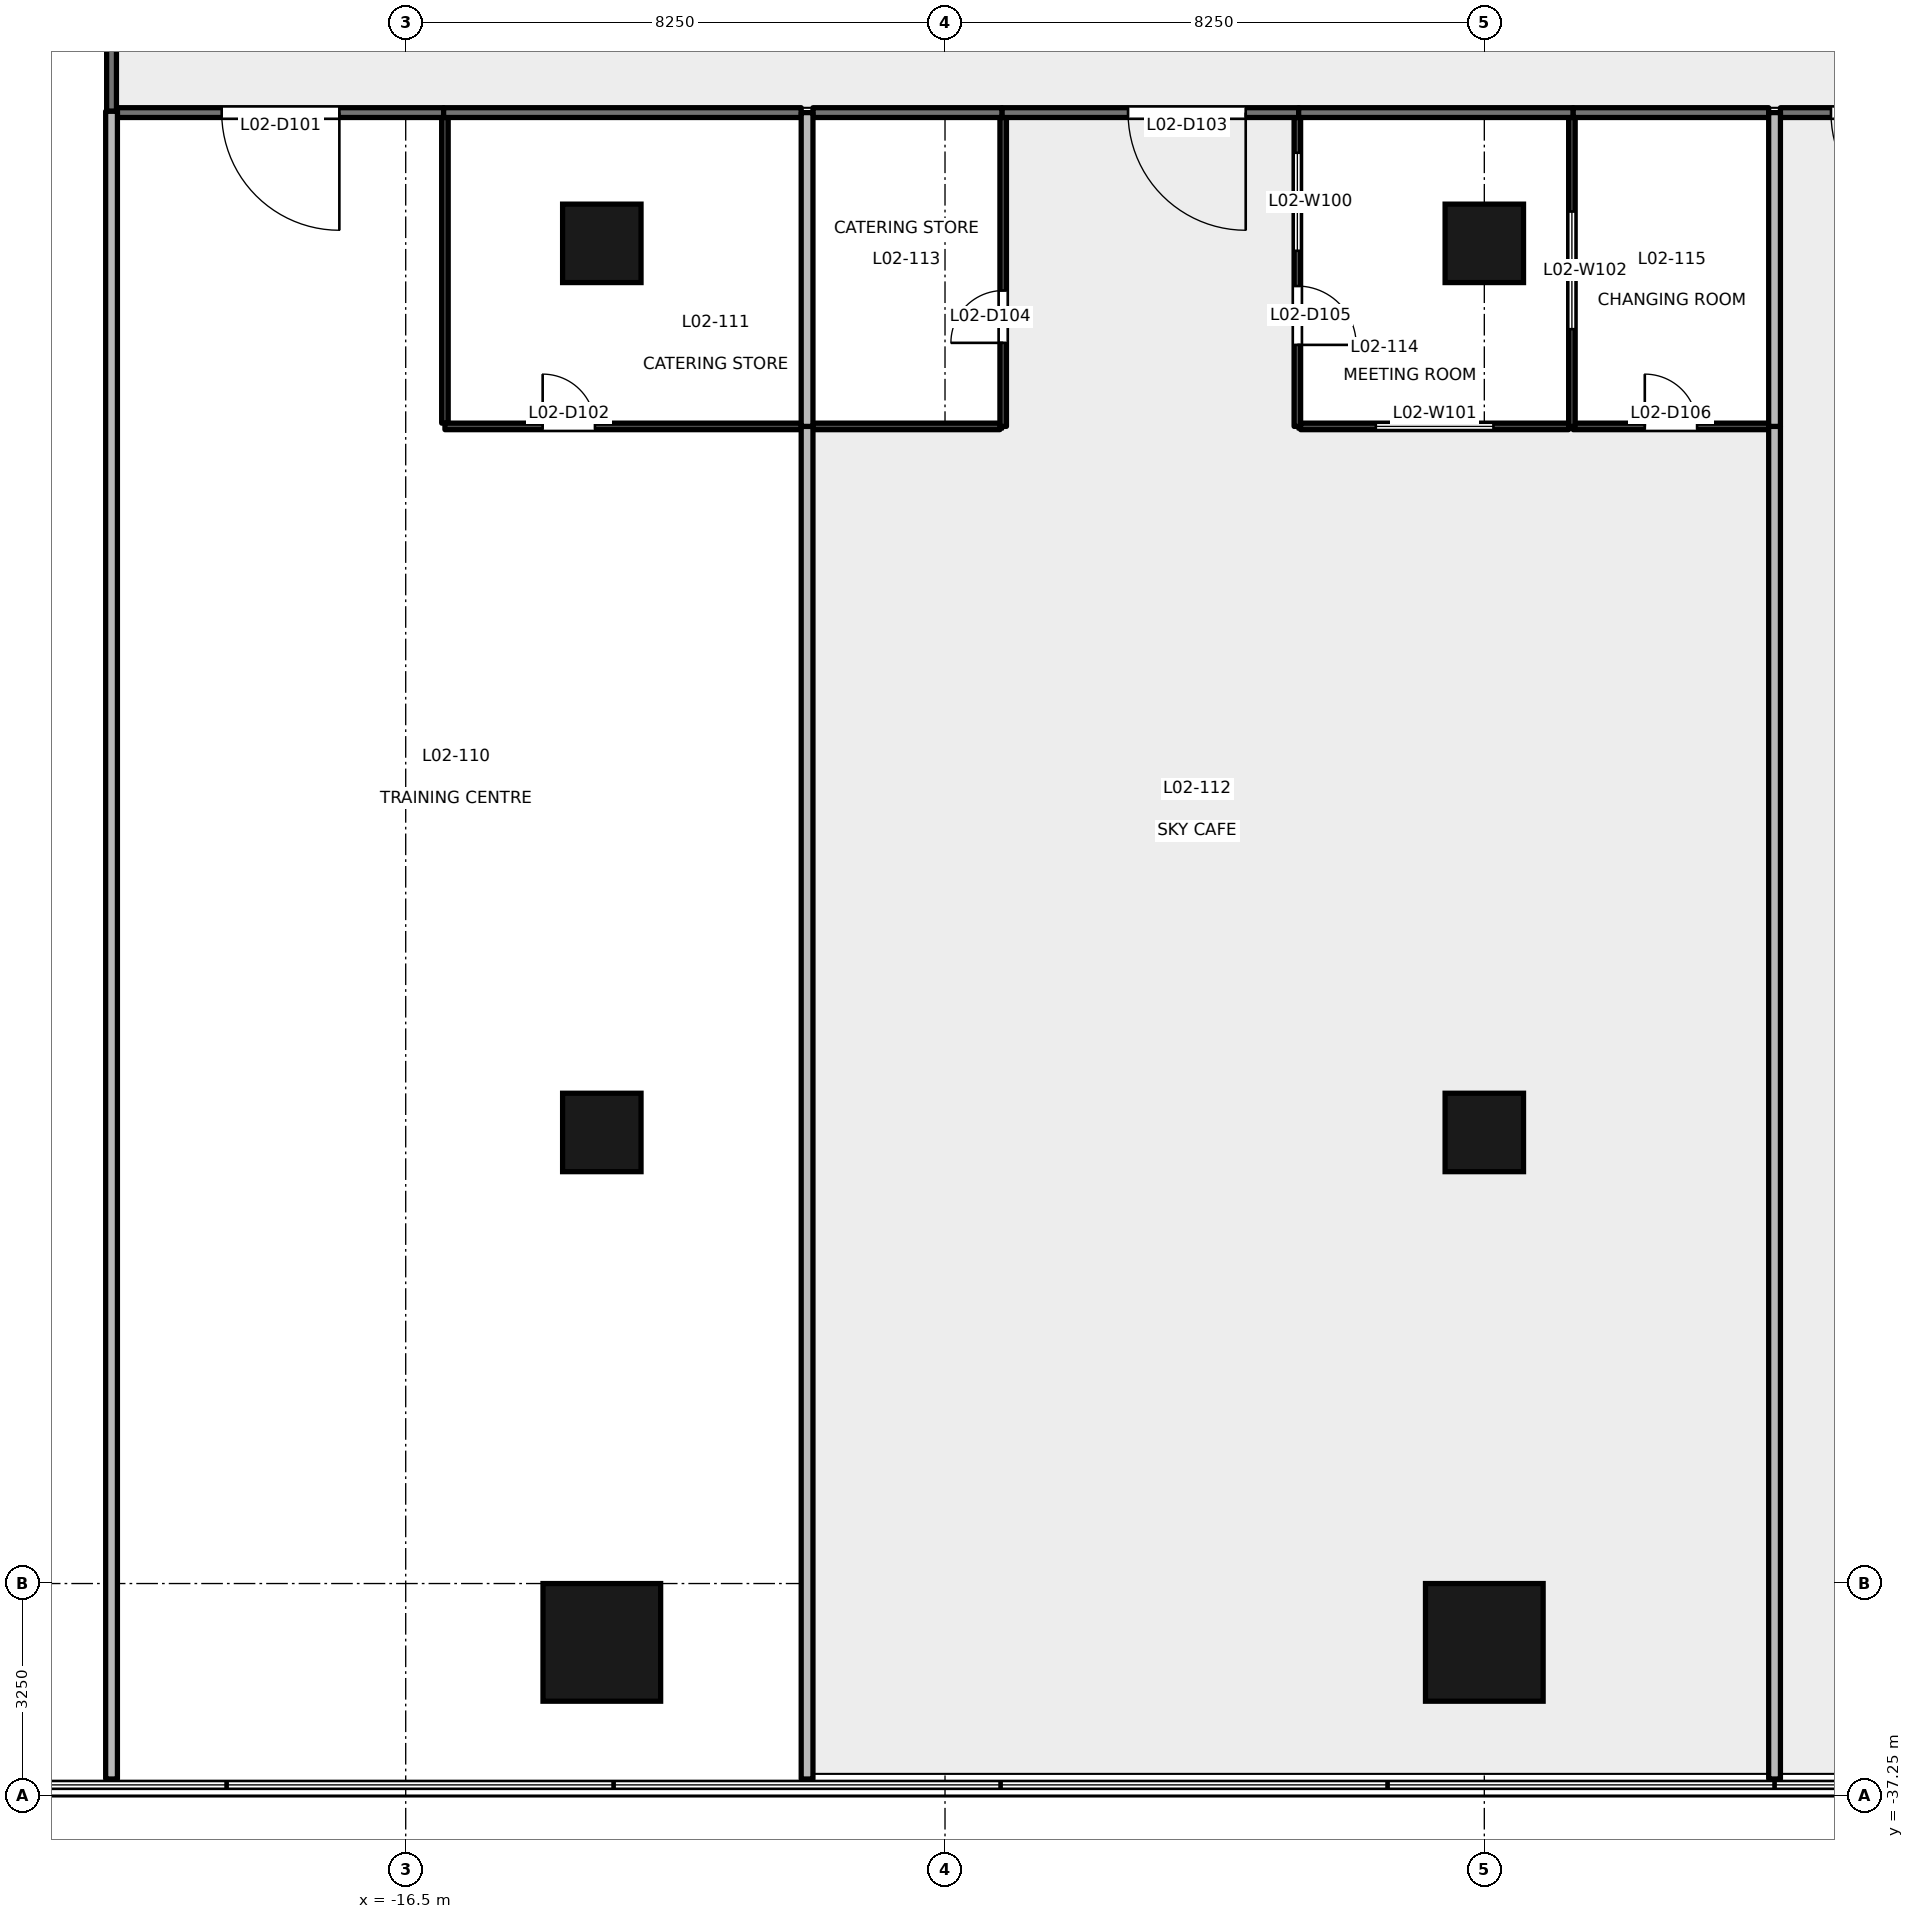
"""IFC4 building model, lengths in metres.
Left out: names, types, materials, properties, quantities, classifications, styles, units other than length and angle.
Written with IfcOpenShell. Run it as: python <this file> out.ifc"""

import sys

from ifc_helpers import new_model, si_unit, direction, frame, frame_2d, origin, origin_2d, place, context, subcontext, project, spatial, rectangle, extrude, element, fill, save


model = new_model("IFC4")
c1 = context("Model", 3, precision=1e-05, world=origin(), true_north=direction((0.0, 1.0)))
c2 = subcontext(c1, "Body", "Model", "MODEL_VIEW")
j1 = project(units=[si_unit("LENGTHUNIT", "METRE"), si_unit("PLANEANGLEUNIT", "RADIAN")], contexts=[c1])
p1 = place(None, origin())
s1 = spatial("IfcSite", under=j1, at=p1, CompositionType="ELEMENT")
p2 = place(p1, origin())
s2 = spatial("IfcBuilding", under=s1, at=p2, CompositionType="ELEMENT")
p3 = place(p2, frame((0.0, 0.0, 12.6)))
s3 = spatial("IfcBuildingStorey", under=s2, at=p3, CompositionType="ELEMENT", Elevation=12.6)
for number, where, z_axis, x_axis in (
    (1, (-13.5, -34.9, -0.2), (0.0, 0.0, 1.0), (1.0, 0.0, 0.0)),
    (2, (0.0, -34.9, -0.2), (0.0, 0.0, 1.0), (1.0, 0.0, 0.0)),
):
    element("IfcColumn", number, at=place(p3, frame(where, z_axis=z_axis, x_axis=x_axis)), inside=s3, PredefinedType="COLUMN", context=c2, shape_type="SweptSolid", body=[
        extrude(rectangle(XDim=1.8, YDim=1.8, at=origin_2d()), origin(), (0.0, 0.0, 1.0), 4.8),
    ])
for number, where, z_axis, x_axis in (
    (3, (-13.5, -27.1, -0.2), (0.0, 0.0, 1.0), (1.0, 0.0, 0.0)),
    (4, (0.0, -27.1, -0.2), (0.0, 0.0, 1.0), (1.0, 0.0, 0.0)),
    (5, (-13.5, -13.5, -0.2), (0.0, 0.0, 1.0), (1.0, 0.0, 0.0)),
    (6, (0.0, -13.5, -0.2), (0.0, 0.0, 1.0), (1.0, 0.0, 0.0)),
):
    element("IfcColumn", number, at=place(p3, frame(where, z_axis=z_axis, x_axis=x_axis)), inside=s3, PredefinedType="COLUMN", context=c2, shape_type="SweptSolid", body=[
        extrude(rectangle(XDim=1.2, YDim=1.2, at=origin_2d()), origin(), (0.0, 0.0, 1.0), 4.8),
    ])
p4 = place(p3, frame((-21.0, -11.48, 0.0), z_axis=(0.0, 0.0, 1.0), x_axis=(0.0, 1.0, 0.0)))
e7 = element("IfcWall", 7, at=p4, inside=s3, PredefinedType="PARTITIONING", context=c2, shape_type="SweptSolid", body=[
    extrude(rectangle(XDim=4.08, YDim=0.15, at=frame_2d((2.04, 0.0))), origin(), (0.0, 0.0, 1.0), 4.6),
])
p5 = place(p4, frame((1.054, 0.0, 0.0)))
e8 = element("IfcOpeningElement", 8, at=p5, cuts=e7, PredefinedType="OPENING", context=c2, shape_type="SweptSolid", body=[
    extrude(rectangle(XDim=0.9, YDim=2.1, at=frame_2d((0.45, 1.05))), frame((0.0, 0.085, 0.0), z_axis=(0.0, -1.0, 0.0), x_axis=(1.0, 0.0, 0.0)), (0.0, 0.0, 1.0), 0.171),
])
p6 = place(p3, frame((-15.92, -11.5, 0.0), z_axis=(0.0, 0.0, 1.0), x_axis=(-1.0, 0.0, 0.0)))
e9 = element("IfcWall", 9, at=p6, inside=s3, PredefinedType="PARTITIONING", context=c2, shape_type="SweptSolid", body=[
    extrude(rectangle(XDim=4.99, YDim=0.15, at=frame_2d((2.495, 0.0))), origin(), (0.0, 0.0, 1.0), 4.3),
])
p7 = place(p6, frame((1.595, 0.0, 0.0)))
e10 = element("IfcOpeningElement", 10, at=p7, cuts=e9, PredefinedType="OPENING", context=c2, shape_type="SweptSolid", body=[
    extrude(rectangle(XDim=1.8, YDim=2.1, at=frame_2d((0.9, 1.05))), frame((0.0, 0.085, 0.0), z_axis=(0.0, -1.0, 0.0), x_axis=(1.0, 0.0, 0.0)), (0.0, 0.0, 1.0), 0.171),
])
p8 = place(p3, frame((-10.45, -11.5, 0.0), z_axis=(0.0, 0.0, 1.0), x_axis=(-1.0, 0.0, 0.0)))
e11 = element("IfcWall", 11, at=p8, inside=s3, PredefinedType="PARTITIONING", context=c2, shape_type="SweptSolid", body=[
    extrude(rectangle(XDim=5.47, YDim=0.15, at=frame_2d((2.735, 0.0))), origin(), (0.0, 0.0, 1.0), 3.2),
])
p9 = place(p3, frame((-2.84, -11.5, 0.0), z_axis=(0.0, 0.0, 1.0), x_axis=(-1.0, 0.0, 0.0)))
e12 = element("IfcWall", 12, at=p9, inside=s3, PredefinedType="PARTITIONING", context=c2, shape_type="SweptSolid", body=[
    extrude(rectangle(XDim=4.54, YDim=0.15, at=frame_2d((2.27, 0.0))), origin(), (0.0, 0.0, 1.0), 4.3),
])
p10 = place(p9, frame((0.81, 0.0, 0.0)))
e13 = element("IfcOpeningElement", 13, at=p10, cuts=e12, PredefinedType="OPENING", context=c2, shape_type="SweptSolid", body=[
    extrude(rectangle(XDim=1.8, YDim=2.1, at=frame_2d((0.9, 1.05))), frame((0.0, 0.085, 0.0), z_axis=(0.0, -1.0, 0.0), x_axis=(1.0, 0.0, 0.0)), (0.0, 0.0, 1.0), 0.171),
])
p11 = place(p3, frame((-7.38, -11.5, 0.0), z_axis=(0.0, 0.0, 1.0), x_axis=(-1.0, 0.0, 0.0)))
e14 = element("IfcWall", 14, at=p11, inside=s3, PredefinedType="PARTITIONING", context=c2, shape_type="SweptSolid", body=[
    extrude(rectangle(XDim=2.89, YDim=0.15, at=frame_2d((1.445, 0.0))), origin(), (0.0, 0.0, 1.0), 4.3),
])
p12 = place(p3, frame((1.36, -11.5, 0.0), z_axis=(0.0, 0.0, 1.0), x_axis=(-1.0, 0.0, 0.0)))
e15 = element("IfcWall", 15, at=p12, inside=s3, PredefinedType="PARTITIONING", context=c2, shape_type="SweptSolid", body=[
    extrude(rectangle(XDim=4.2, YDim=0.15, at=frame_2d((2.1, 0.0))), origin(), (0.0, 0.0, 1.0), 3.2),
])
p13 = place(p3, frame((4.35, -11.5, 0.0), z_axis=(0.0, 0.0, 1.0), x_axis=(-1.0, 0.0, 0.0)))
e16 = element("IfcWall", 16, at=p13, inside=s3, PredefinedType="PARTITIONING", context=c2, shape_type="SweptSolid", body=[
    extrude(rectangle(XDim=2.99, YDim=0.15, at=frame_2d((1.495, 0.0))), origin(), (0.0, 0.0, 1.0), 4.6),
])
p14 = place(p3, frame((8.92, -11.5, 0.0), z_axis=(0.0, 0.0, 1.0), x_axis=(-1.0, 0.0, 0.0)))
e17 = element("IfcWall", 17, at=p14, inside=s3, PredefinedType="PARTITIONING", context=c2, shape_type="SweptSolid", body=[
    extrude(rectangle(XDim=4.39, YDim=0.15, at=frame_2d((2.195, 0.0))), origin(), (0.0, 0.0, 1.0), 4.3),
])
p15 = place(p14, frame((1.817, 0.0, 0.0)))
e18 = element("IfcOpeningElement", 18, at=p15, cuts=e17, PredefinedType="OPENING", context=c2, shape_type="SweptSolid", body=[
    extrude(rectangle(XDim=1.8, YDim=2.1, at=frame_2d((0.9, 1.05))), frame((0.0, 0.085, 0.0), z_axis=(0.0, -1.0, 0.0), x_axis=(1.0, 0.0, 0.0)), (0.0, 0.0, 1.0), 0.171),
])
p16 = place(p3, frame((-21.0, -11.48, 0.0), z_axis=(0.0, 0.0, 1.0), x_axis=(0.0, -1.0, 0.0)))
e19 = element("IfcWall", 19, at=p16, inside=s3, PredefinedType="PARTITIONING", context=c2, shape_type="SweptSolid", body=[
    extrude(rectangle(XDim=25.51, YDim=0.18, at=frame_2d((12.755, 0.0))), origin(), (0.0, 0.0, 1.0), 3.6),
])
p17 = place(p3, frame((-15.9, -11.575, 0.0), z_axis=(0.0, 0.0, 1.0), x_axis=(0.0, -1.0, 0.0)))
e20 = element("IfcWall", 20, at=p17, inside=s3, PredefinedType="PARTITIONING", context=c2, shape_type="SweptSolid", body=[
    extrude(rectangle(XDim=4.675, YDim=0.1, at=frame_2d((2.337, 0.0))), origin(), (0.0, 0.0, 1.0), 3.6),
])
p18 = place(p3, frame((-15.9, -16.3, 0.0), z_axis=(0.0, 0.0, 1.0), x_axis=(1.0, 0.0, 0.0)))
e21 = element("IfcWall", 21, at=p18, inside=s3, PredefinedType="PARTITIONING", context=c2, shape_type="SweptSolid", body=[
    extrude(rectangle(XDim=5.45, YDim=0.1, at=frame_2d((2.725, 0.0))), origin(), (0.0, 0.0, 1.0), 3.6),
])
p19 = place(p18, frame((1.495, 0.0, 0.0)))
e22 = element("IfcOpeningElement", 22, at=p19, cuts=e21, PredefinedType="OPENING", context=c2, shape_type="SweptSolid", body=[
    extrude(rectangle(XDim=0.8, YDim=2.1, at=frame_2d((0.4, 1.05))), frame((0.0, 0.061, 0.0), z_axis=(0.0, -1.0, 0.0), x_axis=(1.0, 0.0, 0.0)), (0.0, 0.0, 1.0), 0.121),
])
p20 = place(p3, frame((-10.36, -16.3, 0.0), z_axis=(0.0, 0.0, 1.0), x_axis=(0.0, -1.0, 0.0)))
e23 = element("IfcWall", 23, at=p20, inside=s3, PredefinedType="PARTITIONING", context=c2, shape_type="SweptSolid", body=[
    extrude(rectangle(XDim=20.69, YDim=0.18, at=frame_2d((10.345, 0.0))), origin(), (0.0, 0.0, 1.0), 3.6),
])
p21 = place(p3, frame((-10.36, -11.5, 0.0), z_axis=(0.0, 0.0, 1.0), x_axis=(0.0, -1.0, 0.0)))
e24 = element("IfcWall", 24, at=p21, inside=s3, PredefinedType="PARTITIONING", context=c2, shape_type="SweptSolid", body=[
    extrude(rectangle(XDim=4.8, YDim=0.18, at=frame_2d((2.4, 0.0))), origin(), (0.0, 0.0, 1.0), 3.6),
])
p22 = place(p3, frame((-10.27, -16.3, 0.0), z_axis=(0.0, 0.0, 1.0), x_axis=(1.0, 0.0, 0.0)))
e25 = element("IfcWall", 25, at=p22, inside=s3, PredefinedType="PARTITIONING", context=c2, shape_type="SweptSolid", body=[
    extrude(rectangle(XDim=2.86, YDim=0.1, at=frame_2d((1.43, 0.0))), origin(), (0.0, 0.0, 1.0), 3.99),
])
p23 = place(p3, frame((-7.36, -16.3, 0.0), z_axis=(0.0, 0.0, 1.0), x_axis=(0.0, 1.0, 0.0)))
e26 = element("IfcWall", 26, at=p23, inside=s3, PredefinedType="PARTITIONING", context=c2, shape_type="SweptSolid", body=[
    extrude(rectangle(XDim=4.725, YDim=0.1, at=frame_2d((2.363, 0.0))), origin(), (0.0, 0.0, 1.0), 3.6),
])
p24 = place(p23, frame((1.278, 0.0, 0.0)))
e27 = element("IfcOpeningElement", 27, at=p24, cuts=e26, PredefinedType="OPENING", context=c2, shape_type="SweptSolid", body=[
    extrude(rectangle(XDim=0.8, YDim=2.1, at=frame_2d((0.4, 1.05))), frame((0.0, 0.061, 0.0), z_axis=(0.0, -1.0, 0.0), x_axis=(1.0, 0.0, 0.0)), (0.0, 0.0, 1.0), 0.121),
])
p25 = place(p3, frame((-2.86, -11.575, 0.0), z_axis=(0.0, 0.0, 1.0), x_axis=(0.0, -1.0, 0.0)))
e28 = element("IfcWall", 28, at=p25, inside=s3, PredefinedType="PARTITIONING", context=c2, shape_type="SweptSolid", body=[
    extrude(rectangle(XDim=4.725, YDim=0.1, at=frame_2d((2.363, 0.0))), origin(), (0.0, 0.0, 1.0), 3.6),
])
p26 = place(p25, frame((2.578, 0.0, 0.0)))
e29 = element("IfcOpeningElement", 29, at=p26, cuts=e28, PredefinedType="OPENING", context=c2, shape_type="SweptSolid", body=[
    extrude(rectangle(XDim=0.9, YDim=2.1, at=frame_2d((0.45, 1.05))), frame((0.0, 0.061, 0.0), z_axis=(0.0, -1.0, 0.0), x_axis=(1.0, 0.0, 0.0)), (0.0, 0.0, 1.0), 0.121),
])
p27 = place(p25, frame((0.539, 0.0, 0.9)))
e30 = element("IfcOpeningElement", 30, at=p27, cuts=e28, PredefinedType="OPENING", context=c2, shape_type="SweptSolid", body=[
    extrude(rectangle(XDim=1.5, YDim=1.2, at=frame_2d((0.75, 0.6))), frame((0.0, 0.061, 0.0), z_axis=(0.0, -1.0, 0.0), x_axis=(1.0, 0.0, 0.0)), (0.0, 0.0, 1.0), 0.121),
])
p28 = place(p3, frame((-2.81, -16.3, 0.0), z_axis=(0.0, 0.0, 1.0), x_axis=(1.0, 0.0, 0.0)))
e31 = element("IfcWall", 31, at=p28, inside=s3, PredefinedType="PARTITIONING", context=c2, shape_type="SweptSolid", body=[
    extrude(rectangle(XDim=4.1, YDim=0.1, at=frame_2d((2.05, 0.0))), origin(), (0.0, 0.0, 1.0), 3.6),
])
p29 = place(p28, frame((1.15, 0.0, 0.9)))
e32 = element("IfcOpeningElement", 32, at=p29, cuts=e31, PredefinedType="OPENING", context=c2, shape_type="SweptSolid", body=[
    extrude(rectangle(XDim=1.8, YDim=1.2, at=frame_2d((0.9, 0.6))), frame((0.0, 0.061, 0.0), z_axis=(0.0, -1.0, 0.0), x_axis=(1.0, 0.0, 0.0)), (0.0, 0.0, 1.0), 0.121),
])
p30 = place(p3, frame((1.36, -16.3, 0.0), z_axis=(0.0, 0.0, 1.0), x_axis=(1.0, 0.0, 0.0)))
e33 = element("IfcWall", 33, at=p30, inside=s3, PredefinedType="PARTITIONING", context=c2, shape_type="SweptSolid", body=[
    extrude(rectangle(XDim=2.99, YDim=0.1, at=frame_2d((1.495, 0.0))), origin(), (0.0, 0.0, 1.0), 4.6),
])
p31 = place(p30, frame((1.095, 0.0, 0.0)))
e34 = element("IfcOpeningElement", 34, at=p31, cuts=e33, PredefinedType="OPENING", context=c2, shape_type="SweptSolid", body=[
    extrude(rectangle(XDim=0.8, YDim=2.1, at=frame_2d((0.4, 1.05))), frame((0.0, 0.061, 0.0), z_axis=(0.0, -1.0, 0.0), x_axis=(1.0, 0.0, 0.0)), (0.0, 0.0, 1.0), 0.121),
])
p32 = place(p3, frame((4.44, -16.3, 0.0), z_axis=(0.0, 0.0, 1.0), x_axis=(0.0, -1.0, 0.0)))
e35 = element("IfcWall", 35, at=p32, inside=s3, PredefinedType="PARTITIONING", context=c2, shape_type="SweptSolid", body=[
    extrude(rectangle(XDim=20.69, YDim=0.18, at=frame_2d((10.345, 0.0))), origin(), (0.0, 0.0, 1.0), 3.6),
])
p33 = place(p3, frame((1.34, -11.575, 0.0), z_axis=(0.0, 0.0, 1.0), x_axis=(0.0, -1.0, 0.0)))
e36 = element("IfcWall", 36, at=p33, inside=s3, PredefinedType="PARTITIONING", context=c2, shape_type="SweptSolid", body=[
    extrude(rectangle(XDim=4.725, YDim=0.1, at=frame_2d((2.363, 0.0))), origin(), (0.0, 0.0, 1.0), 3.6),
])
p34 = place(p33, frame((1.438, 0.0, 0.9)))
e37 = element("IfcOpeningElement", 37, at=p34, cuts=e36, PredefinedType="OPENING", context=c2, shape_type="SweptSolid", body=[
    extrude(rectangle(XDim=1.8, YDim=1.2, at=frame_2d((0.9, 0.6))), frame((0.0, 0.061, 0.0), z_axis=(0.0, -1.0, 0.0), x_axis=(1.0, 0.0, 0.0)), (0.0, 0.0, 1.0), 0.121),
])
p35 = place(p3, frame((4.44, -11.5, 0.0), z_axis=(0.0, 0.0, 1.0), x_axis=(0.0, -1.0, 0.0)))
e38 = element("IfcWall", 38, at=p35, inside=s3, PredefinedType="PARTITIONING", context=c2, shape_type="SweptSolid", body=[
    extrude(rectangle(XDim=4.8, YDim=0.18, at=frame_2d((2.4, 0.0))), origin(), (0.0, 0.0, 1.0), 3.6),
])
p36 = place(p7, origin())
e39 = element("IfcDoor", 39, at=p36, inside=s3, OperationType="DOUBLE_DOOR_SINGLE_SWING", PredefinedType="DOOR", context=c2, shape_type="SweptSolid", body=[
    extrude(rectangle(XDim=1.8, YDim=2.1, at=frame_2d((0.9, 1.05))), frame((0.0, 0.025, 0.0), z_axis=(0.0, -1.0, 0.0), x_axis=(1.0, 0.0, 0.0)), (0.0, 0.0, 1.0), 0.05),
])
fill(e10, e39)
p37 = place(p19, origin())
e40 = element("IfcDoor", 40, at=p37, inside=s3, OperationType="SINGLE_SWING_LEFT", PredefinedType="DOOR", context=c2, shape_type="SweptSolid", body=[
    extrude(rectangle(XDim=0.8, YDim=2.1, at=frame_2d((0.4, 1.05))), frame((0.0, 0.025, 0.0), z_axis=(0.0, -1.0, 0.0), x_axis=(1.0, 0.0, 0.0)), (0.0, 0.0, 1.0), 0.05),
])
fill(e22, e40)
p38 = place(p10, origin())
e41 = element("IfcDoor", 41, at=p38, inside=s3, OperationType="DOUBLE_DOOR_SINGLE_SWING", PredefinedType="DOOR", context=c2, shape_type="SweptSolid", body=[
    extrude(rectangle(XDim=1.8, YDim=2.1, at=frame_2d((0.9, 1.05))), frame((0.0, 0.025, 0.0), z_axis=(0.0, -1.0, 0.0), x_axis=(1.0, 0.0, 0.0)), (0.0, 0.0, 1.0), 0.05),
])
fill(e13, e41)
p39 = place(p24, origin())
e42 = element("IfcDoor", 42, at=p39, inside=s3, OperationType="SINGLE_SWING_LEFT", PredefinedType="DOOR", context=c2, shape_type="SweptSolid", body=[
    extrude(rectangle(XDim=0.8, YDim=2.1, at=frame_2d((0.4, 1.05))), frame((0.0, 0.025, 0.0), z_axis=(0.0, -1.0, 0.0), x_axis=(1.0, 0.0, 0.0)), (0.0, 0.0, 1.0), 0.05),
])
fill(e27, e42)
p40 = place(p26, origin())
e43 = element("IfcDoor", 43, at=p40, inside=s3, OperationType="SINGLE_SWING_RIGHT", PredefinedType="DOOR", context=c2, shape_type="SweptSolid", body=[
    extrude(rectangle(XDim=0.9, YDim=2.1, at=frame_2d((0.45, 1.05))), frame((0.0, 0.025, 0.0), z_axis=(0.0, -1.0, 0.0), x_axis=(1.0, 0.0, 0.0)), (0.0, 0.0, 1.0), 0.05),
])
fill(e29, e43)
p41 = place(p31, origin())
e44 = element("IfcDoor", 44, at=p41, inside=s3, OperationType="SINGLE_SWING_LEFT", PredefinedType="DOOR", context=c2, shape_type="SweptSolid", body=[
    extrude(rectangle(XDim=0.8, YDim=2.1, at=frame_2d((0.4, 1.05))), frame((0.0, 0.025, 0.0), z_axis=(0.0, -1.0, 0.0), x_axis=(1.0, 0.0, 0.0)), (0.0, 0.0, 1.0), 0.05),
])
fill(e34, e44)
p42 = place(p15, origin())
e45 = element("IfcDoor", 45, at=p42, inside=s3, OperationType="DOUBLE_DOOR_SINGLE_SWING", PredefinedType="DOOR", context=c2, shape_type="SweptSolid", body=[
    extrude(rectangle(XDim=1.8, YDim=2.1, at=frame_2d((0.9, 1.05))), frame((0.0, 0.025, 0.0), z_axis=(0.0, -1.0, 0.0), x_axis=(1.0, 0.0, 0.0)), (0.0, 0.0, 1.0), 0.05),
])
fill(e18, e45)
p43 = place(p27, origin())
e46 = element("IfcWindow", 46, at=p43, inside=s3, PartitioningType="SINGLE_PANEL", PredefinedType="WINDOW", context=c2, shape_type="SweptSolid", body=[
    extrude(rectangle(XDim=1.5, YDim=1.2, at=frame_2d((0.75, 0.6))), frame((0.0, 0.03, 0.0), z_axis=(0.0, -1.0, 0.0), x_axis=(1.0, 0.0, 0.0)), (0.0, 0.0, 1.0), 0.06),
])
fill(e30, e46)
p44 = place(p29, origin())
e47 = element("IfcWindow", 47, at=p44, inside=s3, PartitioningType="SINGLE_PANEL", PredefinedType="WINDOW", context=c2, shape_type="SweptSolid", body=[
    extrude(rectangle(XDim=1.8, YDim=1.2, at=frame_2d((0.9, 0.6))), frame((0.0, 0.03, 0.0), z_axis=(0.0, -1.0, 0.0), x_axis=(1.0, 0.0, 0.0)), (0.0, 0.0, 1.0), 0.06),
])
fill(e32, e47)
p45 = place(p34, origin())
e48 = element("IfcWindow", 48, at=p45, inside=s3, PartitioningType="SINGLE_PANEL", PredefinedType="WINDOW", context=c2, shape_type="SweptSolid", body=[
    extrude(rectangle(XDim=1.8, YDim=1.2, at=frame_2d((0.9, 0.6))), frame((0.0, 0.03, 0.0), z_axis=(0.0, -1.0, 0.0), x_axis=(1.0, 0.0, 0.0)), (0.0, 0.0, 1.0), 0.06),
])
fill(e37, e48)
save(model, sys.argv[1])
